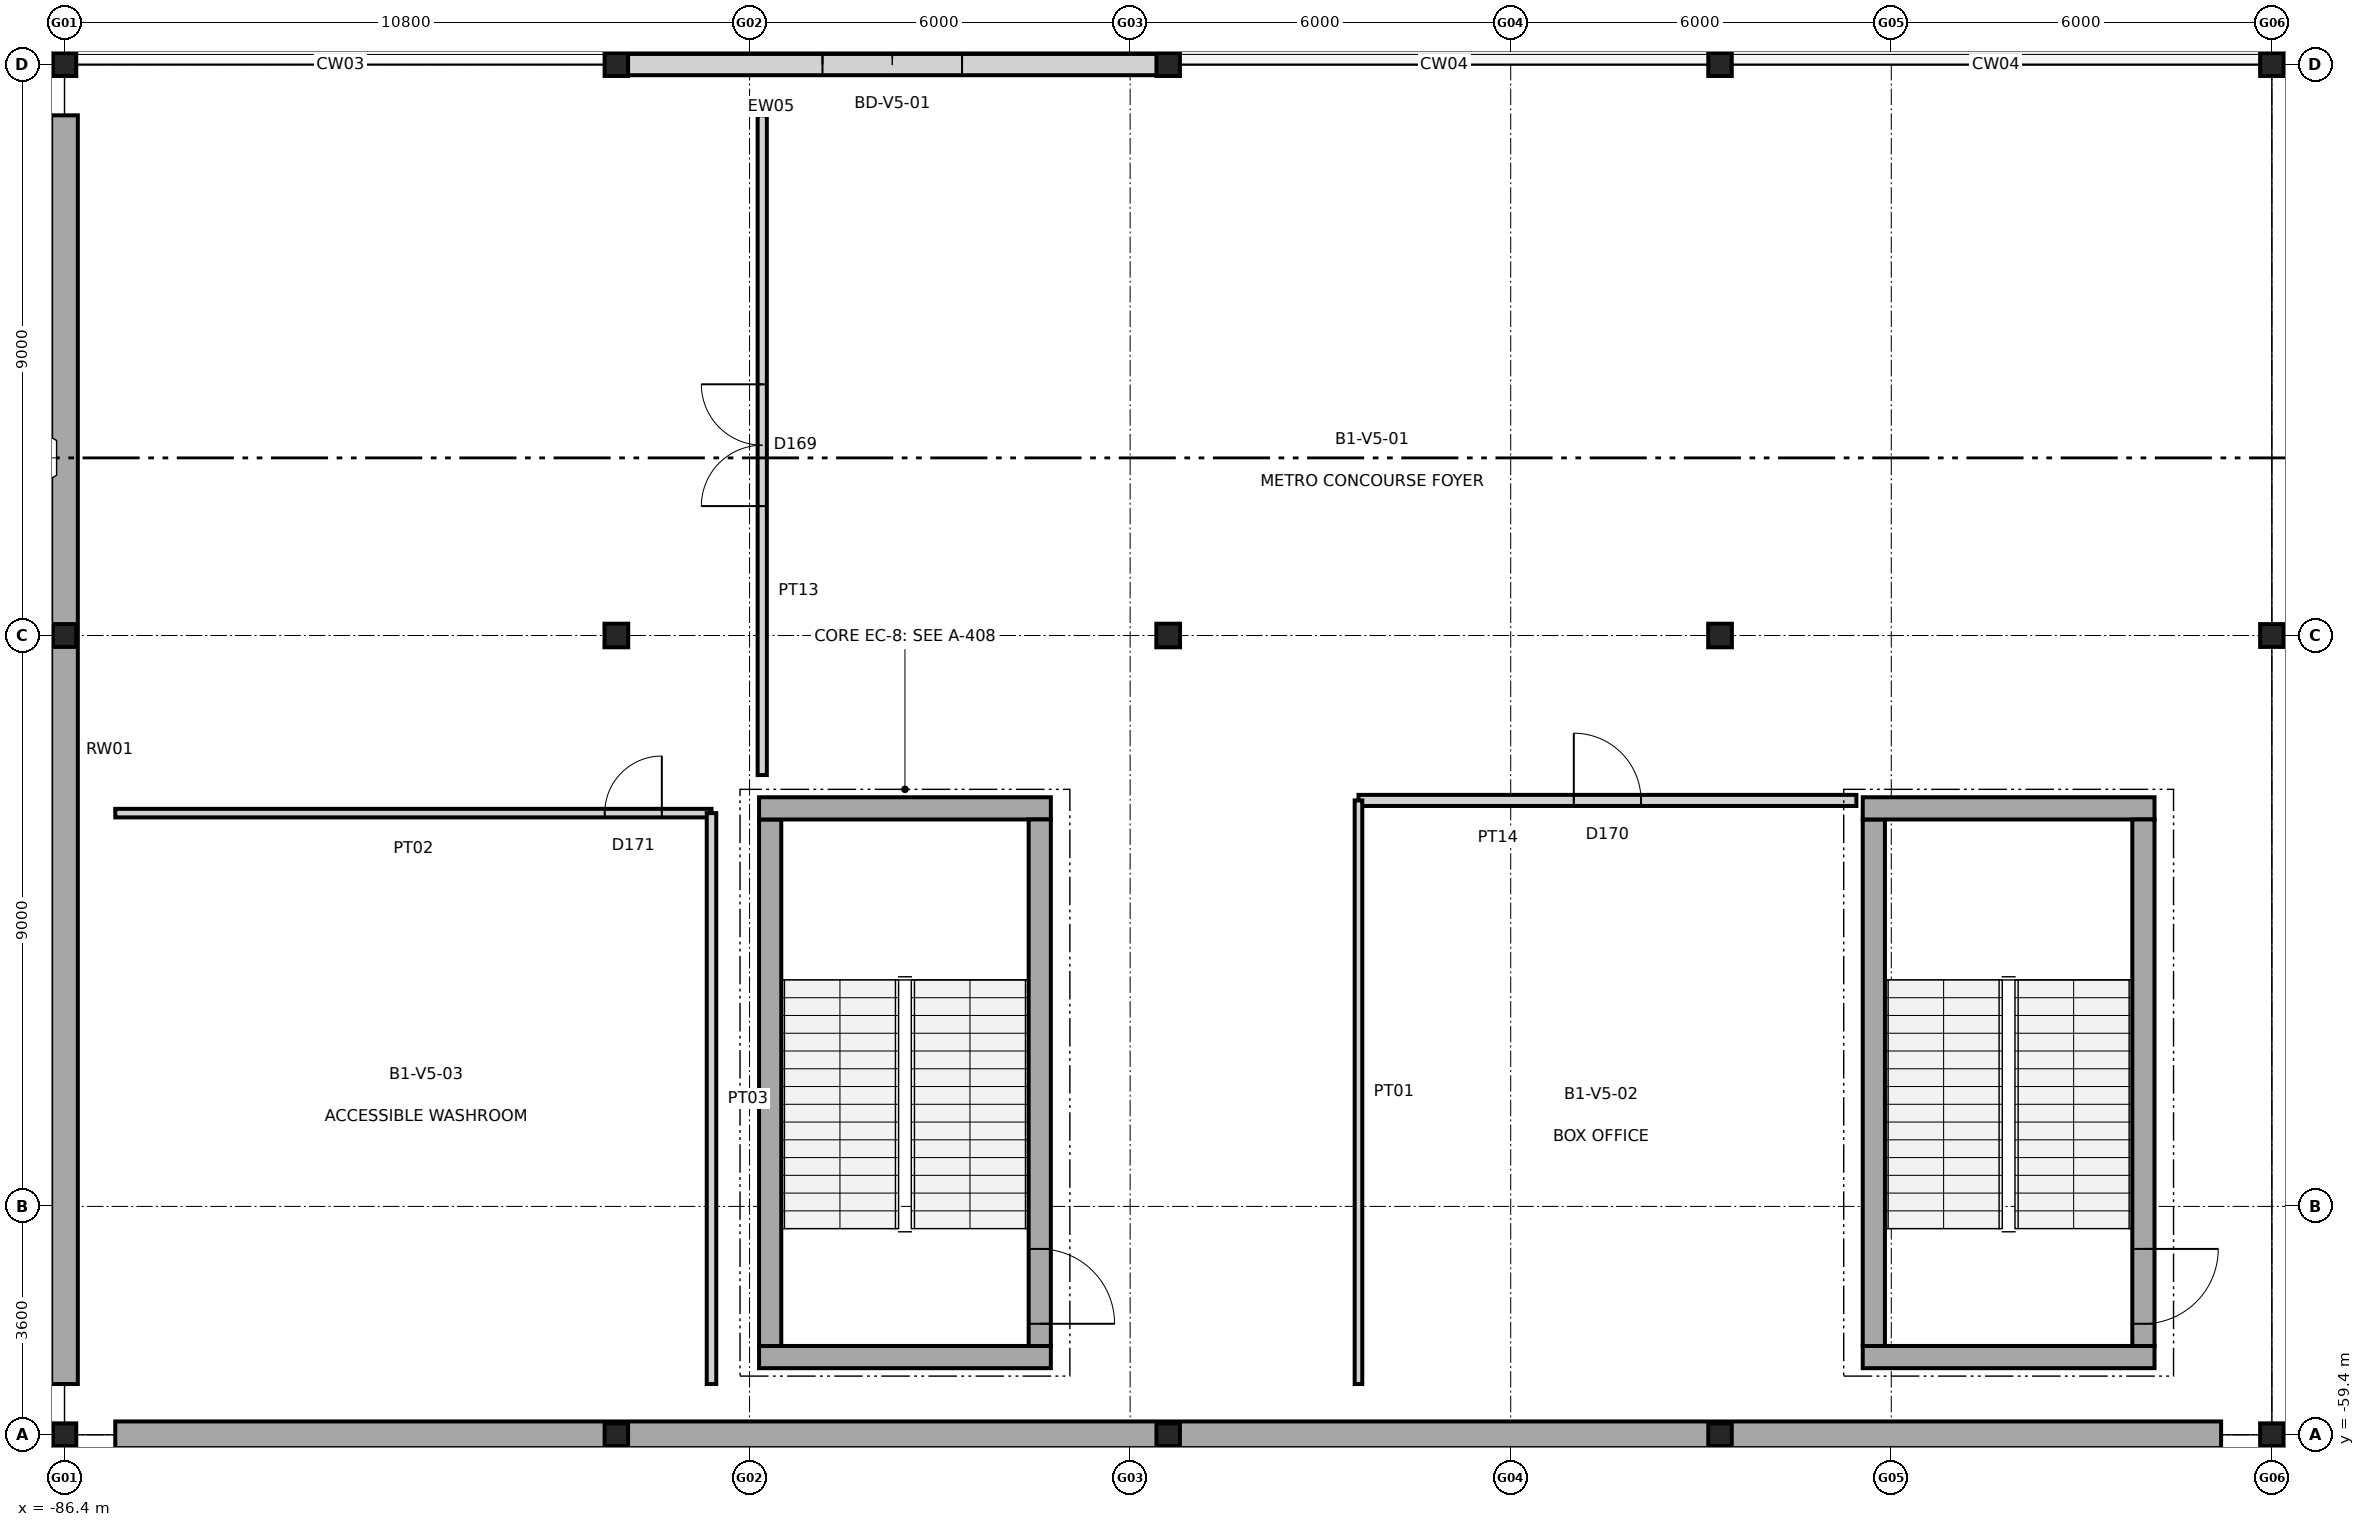
"""IFC4 building model, lengths in metres.
Left out: names, types, materials, properties, quantities, classifications, styles, units other than length and angle.
Written with IfcOpenShell. Run it as: python <this file> out.ifc"""

import sys

from ifc_helpers import new_model, si_unit, direction, frame, frame_2d, origin, origin_2d, place, context, subcontext, project, spatial, rectangle, i_section, extrude, element, fill, save


model = new_model("IFC4")
c1 = context("Model", 3, precision=1e-05, world=origin(), true_north=direction((0.0, 1.0)))
c2 = subcontext(c1, "Body", "Model", "MODEL_VIEW")
j1 = project(units=[si_unit("LENGTHUNIT", "METRE"), si_unit("PLANEANGLEUNIT", "RADIAN")], contexts=[c1])
p1 = place(None, origin())
s1 = spatial("IfcSite", under=j1, at=p1, CompositionType="ELEMENT")
p2 = place(p1, origin())
s2 = spatial("IfcBuilding", under=s1, at=p2, CompositionType="ELEMENT")
p3 = place(p2, frame((0.0, 0.0, -5.4)))
s3 = spatial("IfcBuildingStorey", under=s2, at=p3, CompositionType="ELEMENT", Elevation=-5.4)
for number, where, z_axis, x_axis in (
    (1, (-86.4, -59.4, 0.0), (0.0, 0.0, 1.0), (1.0, 0.0, 0.0)),
    (2, (-86.4, -46.8, 0.0), (0.0, 0.0, 1.0), (1.0, 0.0, 0.0)),
    (3, (-86.4, -37.8, 0.0), (0.0, 0.0, 1.0), (1.0, 0.0, 0.0)),
    (4, (-77.7, -59.4, 0.0), (0.0, 0.0, 1.0), (1.0, 0.0, 0.0)),
):
    element("IfcColumn", number, at=place(p3, frame(where, z_axis=z_axis, x_axis=x_axis)), inside=s3, PredefinedType="COLUMN", context=c2, shape_type="SweptSolid", body=[
        extrude(i_section(OverallWidth=0.37, OverallDepth=0.36, WebThickness=0.012, FlangeThickness=0.02, at=origin_2d()), origin(), (0.0, 0.0, 1.0), 5.4),
    ])
p4 = place(p3, frame((-77.7, -46.8, 0.0), z_axis=(0.0, 0.0, 1.0), x_axis=(1.0, 0.0, 0.0)))
e5 = element("IfcColumn", 5, at=p4, inside=s3, PredefinedType="COLUMN", context=c2, shape_type="SweptSolid", body=[
    extrude(i_section(OverallWidth=0.374, OverallDepth=0.372, WebThickness=0.016, FlangeThickness=0.026, at=origin_2d()), origin(), (0.0, 0.0, 1.0), 5.4),
])
for number, where, z_axis, x_axis in (
    (6, (-77.7, -37.8, 0.0), (0.0, 0.0, 1.0), (1.0, 0.0, 0.0)),
    (7, (-69.0, -59.4, 0.0), (0.0, 0.0, 1.0), (1.0, 0.0, 0.0)),
):
    element("IfcColumn", number, at=place(p3, frame(where, z_axis=z_axis, x_axis=x_axis)), inside=s3, PredefinedType="COLUMN", context=c2, shape_type="SweptSolid", body=[
        extrude(i_section(OverallWidth=0.37, OverallDepth=0.36, WebThickness=0.012, FlangeThickness=0.02, at=origin_2d()), origin(), (0.0, 0.0, 1.0), 5.4),
    ])
p5 = place(p3, frame((-69.0, -46.8, 0.0), z_axis=(0.0, 0.0, 1.0), x_axis=(1.0, 0.0, 0.0)))
e8 = element("IfcColumn", 8, at=p5, inside=s3, PredefinedType="COLUMN", context=c2, shape_type="SweptSolid", body=[
    extrude(i_section(OverallWidth=0.374, OverallDepth=0.372, WebThickness=0.016, FlangeThickness=0.026, at=origin_2d()), origin(), (0.0, 0.0, 1.0), 5.4),
])
for number, where, z_axis, x_axis in (
    (9, (-69.0, -37.8, 0.0), (0.0, 0.0, 1.0), (1.0, 0.0, 0.0)),
    (10, (-60.3, -59.4, 0.0), (0.0, 0.0, 1.0), (1.0, 0.0, 0.0)),
):
    element("IfcColumn", number, at=place(p3, frame(where, z_axis=z_axis, x_axis=x_axis)), inside=s3, PredefinedType="COLUMN", context=c2, shape_type="SweptSolid", body=[
        extrude(i_section(OverallWidth=0.37, OverallDepth=0.36, WebThickness=0.012, FlangeThickness=0.02, at=origin_2d()), origin(), (0.0, 0.0, 1.0), 5.4),
    ])
p6 = place(p3, frame((-60.3, -46.8, 0.0), z_axis=(0.0, 0.0, 1.0), x_axis=(1.0, 0.0, 0.0)))
e11 = element("IfcColumn", 11, at=p6, inside=s3, PredefinedType="COLUMN", context=c2, shape_type="SweptSolid", body=[
    extrude(i_section(OverallWidth=0.374, OverallDepth=0.372, WebThickness=0.016, FlangeThickness=0.026, at=origin_2d()), origin(), (0.0, 0.0, 1.0), 5.4),
])
for number, where, z_axis, x_axis in (
    (12, (-60.3, -37.8, 0.0), (0.0, 0.0, 1.0), (1.0, 0.0, 0.0)),
    (13, (-51.6, -59.4, 0.0), (0.0, 0.0, 1.0), (1.0, 0.0, 0.0)),
    (14, (-51.6, -46.8, 0.0), (0.0, 0.0, 1.0), (1.0, 0.0, 0.0)),
    (15, (-51.6, -37.8, 0.0), (0.0, 0.0, 1.0), (1.0, 0.0, 0.0)),
):
    element("IfcColumn", number, at=place(p3, frame(where, z_axis=z_axis, x_axis=x_axis)), inside=s3, PredefinedType="COLUMN", context=c2, shape_type="SweptSolid", body=[
        extrude(i_section(OverallWidth=0.37, OverallDepth=0.36, WebThickness=0.012, FlangeThickness=0.02, at=origin_2d()), origin(), (0.0, 0.0, 1.0), 5.4),
    ])
p7 = place(p3, frame((-86.4, -58.6, 0.0), z_axis=(0.0, 0.0, 1.0), x_axis=(0.0, 1.0, 0.0)))
e16 = element("IfcWall", 16, at=p7, inside=s3, PredefinedType="USERDEFINED", context=c2, shape_type="SweptSolid", body=[
    extrude(rectangle(XDim=20.0, YDim=0.42, at=frame_2d((10.0, 0.0))), origin(), (0.0, 0.0, 1.0), 5.11),
])
p8 = place(p3, frame((-85.6, -59.4, 0.0), z_axis=(0.0, 0.0, 1.0), x_axis=(1.0, 0.0, 0.0)))
e17 = element("IfcWall", 17, at=p8, inside=s3, PredefinedType="USERDEFINED", context=c2, shape_type="SweptSolid", body=[
    extrude(rectangle(XDim=33.2, YDim=0.42, at=frame_2d((16.6, 0.0))), origin(), (0.0, 0.0, 1.0), 5.11),
])
p9 = place(p3, frame((-77.69, -37.8, 0.0), z_axis=(0.0, 0.0, 1.0), x_axis=(1.0, 0.0, 0.0)))
e18 = element("IfcWall", 18, at=p9, inside=s3, PredefinedType="STANDARD", context=c2, shape_type="SweptSolid", body=[
    extrude(rectangle(XDim=8.68, YDim=0.335, at=frame_2d((4.34, 0.0))), origin(), (0.0, 0.0, 1.0), 4.85),
])
p10 = place(p9, frame((3.24, 0.0, 0.0)))
e19 = element("IfcOpeningElement", 19, at=p10, cuts=e18, PredefinedType="OPENING", context=c2, shape_type="SweptSolid", body=[
    extrude(rectangle(XDim=2.2, YDim=2.45, at=frame_2d((1.1, 1.225))), frame((0.0, 0.177, 0.0), z_axis=(0.0, -1.0, 0.0), x_axis=(1.0, 0.0, 0.0)), (0.0, 0.0, 1.0), 0.355),
])
p11 = place(p3, frame((-70.85, -58.175, 0.0), z_axis=(0.0, 0.0, 1.0), x_axis=(-1.0, 0.0, 0.0)))
e20 = element("IfcWall", 20, at=p11, inside=s3, PredefinedType="SHEAR", context=c2, shape_type="SweptSolid", body=[
    extrude(rectangle(XDim=4.6, YDim=0.35, at=frame_2d((2.3, 0.0))), origin(), (0.0, 0.0, 1.0), 5.4),
])
p12 = place(p3, frame((-75.275, -58.0, 0.0), z_axis=(0.0, 0.0, 1.0), x_axis=(0.0, 1.0, 0.0)))
e21 = element("IfcWall", 21, at=p12, inside=s3, PredefinedType="SHEAR", context=c2, shape_type="SweptSolid", body=[
    extrude(rectangle(XDim=8.3, YDim=0.35, at=frame_2d((4.15, 0.0))), origin(), (0.0, 0.0, 1.0), 5.4),
])
p13 = place(p3, frame((-75.45, -49.525, 0.0), z_axis=(0.0, 0.0, 1.0), x_axis=(1.0, 0.0, 0.0)))
e22 = element("IfcWall", 22, at=p13, inside=s3, PredefinedType="SHEAR", context=c2, shape_type="SweptSolid", body=[
    extrude(rectangle(XDim=4.6, YDim=0.35, at=frame_2d((2.3, 0.0))), origin(), (0.0, 0.0, 1.0), 5.4),
])
p14 = place(p3, frame((-71.025, -49.7, 0.0), z_axis=(0.0, 0.0, 1.0), x_axis=(0.0, -1.0, 0.0)))
e23 = element("IfcWall", 23, at=p14, inside=s3, PredefinedType="SHEAR", context=c2, shape_type="SweptSolid", body=[
    extrude(rectangle(XDim=8.3, YDim=0.35, at=frame_2d((4.15, 0.0))), origin(), (0.0, 0.0, 1.0), 5.4),
])
p15 = place(p14, frame((6.77, 0.0, 0.0)))
e24 = element("IfcOpeningElement", 24, at=p15, cuts=e23, PredefinedType="OPENING", context=c2, shape_type="SweptSolid", body=[
    extrude(rectangle(XDim=1.18, YDim=2.15, at=frame_2d((0.59, 1.075))), frame((0.0, 0.185, 0.0), z_axis=(0.0, -1.0, 0.0), x_axis=(1.0, 0.0, 0.0)), (0.0, 0.0, 1.0), 0.37),
])
p16 = place(p3, frame((-53.45, -58.175, 0.0), z_axis=(0.0, 0.0, 1.0), x_axis=(-1.0, 0.0, 0.0)))
e25 = element("IfcWall", 25, at=p16, inside=s3, PredefinedType="SHEAR", context=c2, shape_type="SweptSolid", body=[
    extrude(rectangle(XDim=4.6, YDim=0.35, at=frame_2d((2.3, 0.0))), origin(), (0.0, 0.0, 1.0), 5.4),
])
p17 = place(p3, frame((-57.875, -58.0, 0.0), z_axis=(0.0, 0.0, 1.0), x_axis=(0.0, 1.0, 0.0)))
e26 = element("IfcWall", 26, at=p17, inside=s3, PredefinedType="SHEAR", context=c2, shape_type="SweptSolid", body=[
    extrude(rectangle(XDim=8.3, YDim=0.35, at=frame_2d((4.15, 0.0))), origin(), (0.0, 0.0, 1.0), 5.4),
])
p18 = place(p3, frame((-58.05, -49.525, 0.0), z_axis=(0.0, 0.0, 1.0), x_axis=(1.0, 0.0, 0.0)))
e27 = element("IfcWall", 27, at=p18, inside=s3, PredefinedType="SHEAR", context=c2, shape_type="SweptSolid", body=[
    extrude(rectangle(XDim=4.6, YDim=0.35, at=frame_2d((2.3, 0.0))), origin(), (0.0, 0.0, 1.0), 5.4),
])
p19 = place(p3, frame((-53.625, -49.7, 0.0), z_axis=(0.0, 0.0, 1.0), x_axis=(0.0, -1.0, 0.0)))
e28 = element("IfcWall", 28, at=p19, inside=s3, PredefinedType="SHEAR", context=c2, shape_type="SweptSolid", body=[
    extrude(rectangle(XDim=8.3, YDim=0.35, at=frame_2d((4.15, 0.0))), origin(), (0.0, 0.0, 1.0), 5.4),
])
p20 = place(p19, frame((6.77, 0.0, 0.0)))
e29 = element("IfcOpeningElement", 29, at=p20, cuts=e28, PredefinedType="OPENING", context=c2, shape_type="SweptSolid", body=[
    extrude(rectangle(XDim=1.18, YDim=2.15, at=frame_2d((0.59, 1.075))), frame((0.0, 0.185, 0.0), z_axis=(0.0, -1.0, 0.0), x_axis=(1.0, 0.0, 0.0)), (0.0, 0.0, 1.0), 0.37),
])
p21 = place(p3, frame((-75.4, -49.0, 0.0), z_axis=(0.0, 0.0, 1.0), x_axis=(0.0, 1.0, 0.0)))
e30 = element("IfcWall", 30, at=p21, inside=s3, PredefinedType="PARTITIONING", context=c2, shape_type="SweptSolid", body=[
    extrude(rectangle(XDim=10.4, YDim=0.145, at=frame_2d((5.2, 0.0))), origin(), (0.0, 0.0, 1.0), 5.02),
])
p22 = place(p21, frame((4.24, 0.0, 0.0)))
e31 = element("IfcOpeningElement", 31, at=p22, cuts=e30, PredefinedType="OPENING", context=c2, shape_type="SweptSolid", body=[
    extrude(rectangle(XDim=1.92, YDim=2.4, at=frame_2d((0.96, 1.2))), frame((0.0, 0.083, 0.0), z_axis=(0.0, -1.0, 0.0), x_axis=(1.0, 0.0, 0.0)), (0.0, 0.0, 1.0), 0.165),
])
p23 = place(p3, frame((-66.0, -49.4, 0.0), z_axis=(0.0, 0.0, 1.0), x_axis=(1.0, 0.0, 0.0)))
e32 = element("IfcWall", 32, at=p23, inside=s3, PredefinedType="PARTITIONING", context=c2, shape_type="SweptSolid", body=[
    extrude(rectangle(XDim=7.85, YDim=0.175, at=frame_2d((3.925, 0.0))), origin(), (0.0, 0.0, 1.0), 5.02),
])
p24 = place(p23, frame((3.395, 0.0, 0.0)))
e33 = element("IfcOpeningElement", 33, at=p24, cuts=e32, PredefinedType="OPENING", context=c2, shape_type="SweptSolid", body=[
    extrude(rectangle(XDim=1.06, YDim=2.15, at=frame_2d((0.53, 1.075))), frame((0.0, 0.097, 0.0), z_axis=(0.0, -1.0, 0.0), x_axis=(1.0, 0.0, 0.0)), (0.0, 0.0, 1.0), 0.195),
])
p25 = place(p3, frame((-66.0, -58.6, 0.0), z_axis=(0.0, 0.0, 1.0), x_axis=(0.0, 1.0, 0.0)))
e34 = element("IfcWall", 34, at=p25, inside=s3, PredefinedType="PARTITIONING", context=c2, shape_type="SweptSolid", body=[
    extrude(rectangle(XDim=9.2, YDim=0.12, at=frame_2d((4.6, 0.0))), origin(), (0.0, 0.0, 1.0), 5.02),
])
p26 = place(p3, frame((-85.6, -49.6, 0.0), z_axis=(0.0, 0.0, 1.0), x_axis=(1.0, 0.0, 0.0)))
e35 = element("IfcWall", 35, at=p26, inside=s3, PredefinedType="PARTITIONING", context=c2, shape_type="SweptSolid", body=[
    extrude(rectangle(XDim=9.4, YDim=0.135, at=frame_2d((4.7, 0.0))), origin(), (0.0, 0.0, 1.0), 5.02),
])
p27 = place(p26, frame((7.717, 0.0, 0.0)))
e36 = element("IfcOpeningElement", 36, at=p27, cuts=e35, PredefinedType="OPENING", context=c2, shape_type="SweptSolid", body=[
    extrude(rectangle(XDim=0.9, YDim=2.1, at=frame_2d((0.45, 1.05))), frame((0.0, 0.077, 0.0), z_axis=(0.0, -1.0, 0.0), x_axis=(1.0, 0.0, 0.0)), (0.0, 0.0, 1.0), 0.155),
])
p28 = place(p3, frame((-76.2, -58.6, 0.0), z_axis=(0.0, 0.0, 1.0), x_axis=(0.0, 1.0, 0.0)))
e37 = element("IfcWall", 37, at=p28, inside=s3, PredefinedType="PARTITIONING", context=c2, shape_type="SweptSolid", body=[
    extrude(rectangle(XDim=9.0, YDim=0.15, at=frame_2d((4.5, 0.0))), origin(), (0.0, 0.0, 1.0), 5.02),
])
p29 = place(p10, origin())
e38 = element("IfcDoor", 38, at=p29, inside=s3, OperationType="DOUBLE_DOOR_SINGLE_SWING", PredefinedType="DOOR", context=c2, shape_type="SweptSolid", body=[
    extrude(rectangle(XDim=2.2, YDim=2.45, at=frame_2d((1.1, 1.225))), frame((0.0, 0.025, 0.0), z_axis=(0.0, -1.0, 0.0), x_axis=(1.0, 0.0, 0.0)), (0.0, 0.0, 1.0), 0.05),
])
fill(e19, e38)
p30 = place(p15, origin())
e39 = element("IfcDoor", 39, at=p30, inside=s3, OperationType="SINGLE_SWING_RIGHT", PredefinedType="DOOR", context=c2, shape_type="SweptSolid", body=[
    extrude(rectangle(XDim=1.18, YDim=2.15, at=frame_2d((0.59, 1.075))), frame((0.0, 0.025, 0.0), z_axis=(0.0, -1.0, 0.0), x_axis=(1.0, 0.0, 0.0)), (0.0, 0.0, 1.0), 0.05),
])
fill(e24, e39)
p31 = place(p20, origin())
e40 = element("IfcDoor", 40, at=p31, inside=s3, OperationType="SINGLE_SWING_LEFT", PredefinedType="DOOR", context=c2, shape_type="SweptSolid", body=[
    extrude(rectangle(XDim=1.18, YDim=2.15, at=frame_2d((0.59, 1.075))), frame((0.0, 0.025, 0.0), z_axis=(0.0, -1.0, 0.0), x_axis=(1.0, 0.0, 0.0)), (0.0, 0.0, 1.0), 0.05),
])
fill(e29, e40)
p32 = place(p22, origin())
e41 = element("IfcDoor", 41, at=p32, inside=s3, OperationType="DOUBLE_DOOR_SINGLE_SWING", PredefinedType="DOOR", context=c2, shape_type="SweptSolid", body=[
    extrude(rectangle(XDim=1.92, YDim=2.4, at=frame_2d((0.96, 1.2))), frame((0.0, 0.025, 0.0), z_axis=(0.0, -1.0, 0.0), x_axis=(1.0, 0.0, 0.0)), (0.0, 0.0, 1.0), 0.05),
])
fill(e31, e41)
p33 = place(p24, origin())
e42 = element("IfcDoor", 42, at=p33, inside=s3, OperationType="SINGLE_SWING_LEFT", PredefinedType="DOOR", context=c2, shape_type="SweptSolid", body=[
    extrude(rectangle(XDim=1.06, YDim=2.15, at=frame_2d((0.53, 1.075))), frame((0.0, 0.025, 0.0), z_axis=(0.0, -1.0, 0.0), x_axis=(1.0, 0.0, 0.0)), (0.0, 0.0, 1.0), 0.05),
])
fill(e33, e42)
p34 = place(p27, origin())
e43 = element("IfcDoor", 43, at=p34, inside=s3, OperationType="SINGLE_SWING_RIGHT", PredefinedType="DOOR", context=c2, shape_type="SweptSolid", body=[
    extrude(rectangle(XDim=0.9, YDim=2.1, at=frame_2d((0.45, 1.05))), frame((0.0, 0.025, 0.0), z_axis=(0.0, -1.0, 0.0), x_axis=(1.0, 0.0, 0.0)), (0.0, 0.0, 1.0), 0.05),
])
fill(e36, e43)
save(model, sys.argv[1])
